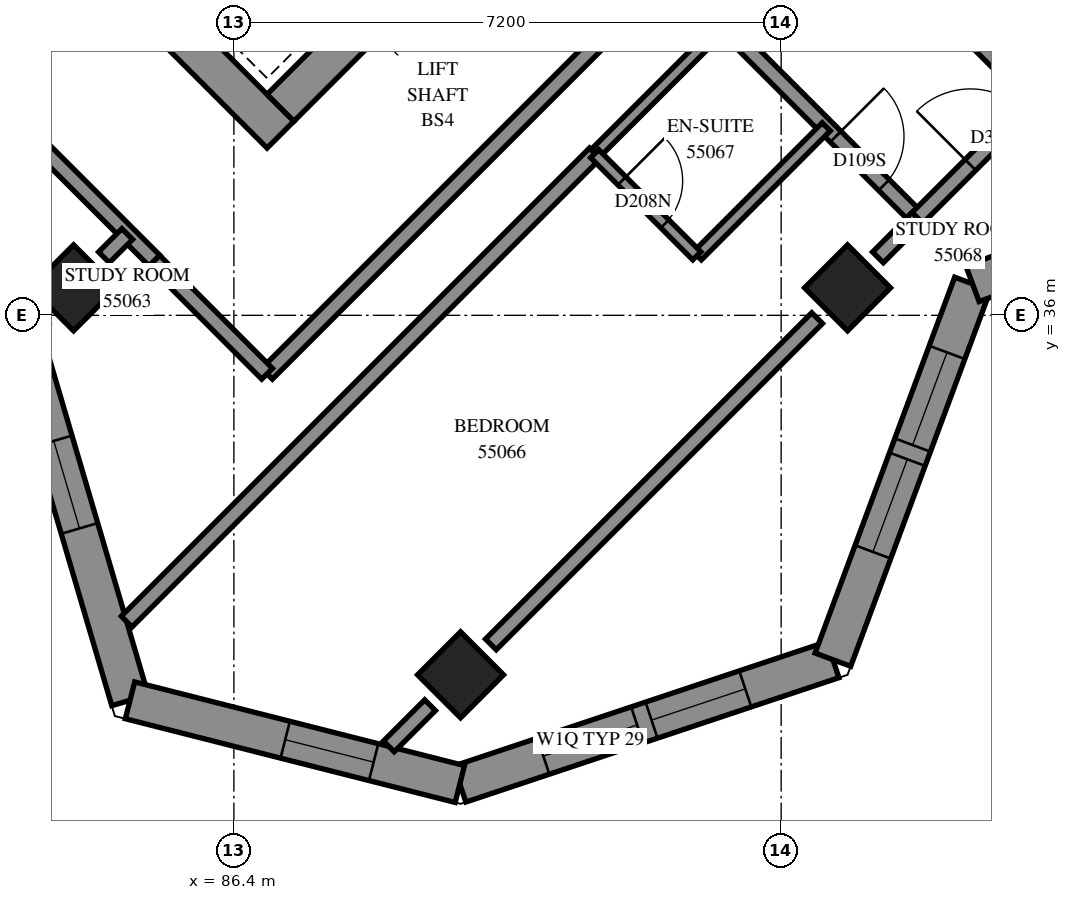
"""IFC4 building model, lengths in metres.
Left out: names, types, materials, properties, quantities, classifications, styles, units other than length and angle.
Written with IfcOpenShell. Run it as: python <this file> out.ifc"""

import sys

from ifc_helpers import new_model, si_unit, direction, frame, frame_2d, origin, origin_2d, place, context, subcontext, project, spatial, polyline, rectangle, outline, extrude, element, fill, save


model = new_model("IFC4")
c1 = context("Model", 3, precision=1e-05, world=origin(), true_north=direction((0.0, 1.0)))
c2 = subcontext(c1, "Body", "Model", "MODEL_VIEW")
j1 = project(units=[si_unit("LENGTHUNIT", "METRE"), si_unit("PLANEANGLEUNIT", "RADIAN")], contexts=[c1])
p1 = place(None, origin())
s1 = spatial("IfcSite", under=j1, at=p1, CompositionType="ELEMENT")
p2 = place(p1, origin())
s2 = spatial("IfcBuilding", under=s1, at=p2, CompositionType="ELEMENT")
p3 = place(p2, frame((0.0, 0.0, 203.2)))
s3 = spatial("IfcBuildingStorey", under=s2, at=p3, CompositionType="ELEMENT", Elevation=203.2)
for number, where, z_axis, x_axis in (
    (1, (84.291, 36.362, 0.0), (0.0, 0.0, 1.0), (0.707, -0.707, 0.0)),
    (2, (94.474, 36.362, 0.0), (0.0, 0.0, 1.0), (0.707, -0.707, 0.0)),
    (3, (89.382, 31.271, 0.0), (0.0, 0.0, 1.0), (0.707, -0.707, 0.0)),
):
    element("IfcColumn", number, at=place(p3, frame(where, z_axis=z_axis, x_axis=x_axis)), inside=s3, PredefinedType="COLUMN", context=c2, shape_type="SweptSolid", body=[
        extrude(rectangle(XDim=0.8, YDim=0.8, at=origin_2d()), origin(), (0.0, 0.0, 1.0), 3.1),
    ])
p4 = place(p3, frame((76.124, 49.267, -0.3), z_axis=(0.0, 0.0, 1.0), x_axis=(0.7071067812, -0.7071067812, 0.0)))
e4 = element("IfcWall", 4, at=p4, inside=s3, PredefinedType="SHEAR", context=c2, shape_type="SweptSolid", body=[
    extrude(rectangle(XDim=15.4, YDim=0.5, at=frame_2d((7.7, 0.0))), origin(), (0.0, 0.0, 1.0), 2.7),
])
p5 = place(p3, frame((87.013, 38.731, -0.3), z_axis=(0.0, 0.0, 1.0), x_axis=(0.7071067812, 0.7071067812, 0.0)))
e5 = element("IfcWall", 5, at=p5, inside=s3, PredefinedType="SHEAR", context=c2, shape_type="SweptSolid", body=[
    extrude(rectangle(XDim=14.4, YDim=0.5, at=frame_2d((7.2, 0.0))), origin(), (0.0, 0.0, 1.0), 2.7),
])
p6 = place(p5, frame((4.55, 0.0, 0.3)))
e6 = element("IfcOpeningElement", 6, at=p6, cuts=e5, PredefinedType="OPENING", context=c2, shape_type="SweptSolid", body=[
    extrude(rectangle(XDim=1.1, YDim=2.1, at=frame_2d((0.55, 1.05))), frame((0.0, 0.26, 0.0), z_axis=(0.0, -1.0, 0.0), x_axis=(1.0, 0.0, 0.0)), (0.0, 0.0, 1.0), 0.52),
])
p7 = place(p5, frame((11.35, 0.0, 0.3)))
e7 = element("IfcOpeningElement", 7, at=p7, cuts=e5, PredefinedType="OPENING", context=c2, shape_type="SweptSolid", body=[
    extrude(rectangle(XDim=1.1, YDim=2.1, at=frame_2d((0.55, 1.05))), frame((0.0, 0.26, 0.0), z_axis=(0.0, -1.0, 0.0), x_axis=(1.0, 0.0, 0.0)), (0.0, 0.0, 1.0), 0.52),
])
p8 = place(p3, frame((89.373, 29.834, 0.0), z_axis=(0.0, 0.0, 1.0), x_axis=(0.9486832981, 0.316227766, 0.0)))
e8 = element("IfcWall", 8, at=p8, inside=s3, PredefinedType="SOLIDWALL", context=c2, shape_type="SweptSolid", body=[
    extrude(outline(polyline([(-0.073, -0.25), (5.293, -0.25), (5.054, 0.25), (0.073, 0.25), (-0.073, -0.25)])), origin(), (0.0, 0.0, 1.0), 3.1),
])
p9 = place(p8, frame((1.159, 0.0, 0.45)))
e9 = element("IfcOpeningElement", 9, at=p9, cuts=e8, PredefinedType="OPENING", context=c2, shape_type="SweptSolid", body=[
    extrude(rectangle(XDim=1.3, YDim=2.5, at=frame_2d((0.65, 1.25))), frame((0.0, 0.26, 0.0), z_axis=(0.0, -1.0, 0.0), x_axis=(1.0, 0.0, 0.0)), (0.0, 0.0, 1.0), 0.52),
])
p10 = place(p8, frame((2.659, 0.0, 0.45)))
e10 = element("IfcOpeningElement", 10, at=p10, cuts=e8, PredefinedType="OPENING", context=c2, shape_type="SweptSolid", body=[
    extrude(rectangle(XDim=1.3, YDim=2.5, at=frame_2d((0.65, 1.25))), frame((0.0, 0.26, 0.0), z_axis=(0.0, -1.0, 0.0), x_axis=(1.0, 0.0, 0.0)), (0.0, 0.0, 1.0), 0.52),
])
p11 = place(p3, frame((94.281, 31.47, 0.0), z_axis=(0.0, 0.0, 1.0), x_axis=(0.3481903374, 0.9374238577, 0.0)))
e11 = element("IfcWall", 11, at=p11, inside=s3, PredefinedType="SOLIDWALL", context=c2, shape_type="SweptSolid", body=[
    extrude(outline(polyline([(-0.12, -0.25), (5.16, -0.25), (5.39, 0.25), (0.12, 0.25), (-0.12, -0.25)])), origin(), (0.0, 0.0, 1.0), 3.1),
])
p12 = place(p11, frame((1.512, 0.0, 0.45)))
e12 = element("IfcOpeningElement", 12, at=p12, cuts=e11, PredefinedType="OPENING", context=c2, shape_type="SweptSolid", body=[
    extrude(rectangle(XDim=1.3, YDim=2.5, at=frame_2d((0.65, 1.25))), frame((0.0, 0.26, 0.0), z_axis=(0.0, -1.0, 0.0), x_axis=(1.0, 0.0, 0.0)), (0.0, 0.0, 1.0), 0.52),
])
p13 = place(p11, frame((3.012, 0.0, 0.45)))
e13 = element("IfcOpeningElement", 13, at=p13, cuts=e11, PredefinedType="OPENING", context=c2, shape_type="SweptSolid", body=[
    extrude(rectangle(XDim=1.3, YDim=2.5, at=frame_2d((0.65, 1.25))), frame((0.0, 0.26, 0.0), z_axis=(0.0, -1.0, 0.0), x_axis=(1.0, 0.0, 0.0)), (0.0, 0.0, 1.0), 0.52),
])
p14 = place(p3, frame((96.118, 36.415, 0.0), z_axis=(0.0, 0.0, 1.0), x_axis=(0.9374238577, 0.3481903374, 0.0)))
e14 = element("IfcWall", 14, at=p14, inside=s3, PredefinedType="SOLIDWALL", context=c2, shape_type="SweptSolid", body=[
    extrude(outline(polyline([(0.115, -0.25), (5.395, -0.25), (5.155, 0.25), (-0.115, 0.25), (0.115, -0.25)])), origin(), (0.0, 0.0, 1.0), 3.1),
])
p15 = place(p14, frame((1.655, 0.0, 0.45)))
e15 = element("IfcOpeningElement", 15, at=p15, cuts=e14, PredefinedType="OPENING", context=c2, shape_type="SweptSolid", body=[
    extrude(rectangle(XDim=1.3, YDim=2.5, at=frame_2d((0.65, 1.25))), frame((0.0, 0.26, 0.0), z_axis=(0.0, -1.0, 0.0), x_axis=(1.0, 0.0, 0.0)), (0.0, 0.0, 1.0), 0.52),
])
p16 = place(p14, frame((3.155, 0.0, 0.45)))
e16 = element("IfcOpeningElement", 16, at=p16, cuts=e14, PredefinedType="OPENING", context=c2, shape_type="SweptSolid", body=[
    extrude(rectangle(XDim=1.3, YDim=2.5, at=frame_2d((0.65, 1.25))), frame((0.0, 0.26, 0.0), z_axis=(0.0, -1.0, 0.0), x_axis=(1.0, 0.0, 0.0)), (0.0, 0.0, 1.0), 0.52),
])
p17 = place(p3, frame((83.74, 35.336, 0.0), z_axis=(0.0, 0.0, 1.0), x_axis=(0.2820577435, -0.9593974303, 0.0)))
e17 = element("IfcWall", 17, at=p17, inside=s3, PredefinedType="SOLIDWALL", context=c2, shape_type="SweptSolid", body=[
    extrude(outline(polyline([(0.136, -0.25), (4.73, -0.25), (4.445, 0.25), (-0.136, 0.25), (0.136, -0.25)])), origin(), (0.0, 0.0, 1.0), 3.1),
])
p18 = place(p17, frame((1.03, 0.0, 0.45)))
e18 = element("IfcOpeningElement", 18, at=p18, cuts=e17, PredefinedType="OPENING", context=c2, shape_type="SweptSolid", body=[
    extrude(rectangle(XDim=1.2, YDim=2.5, at=frame_2d((0.6, 1.25))), frame((0.0, 0.26, 0.0), z_axis=(0.0, -1.0, 0.0), x_axis=(1.0, 0.0, 0.0)), (0.0, 0.0, 1.0), 0.52),
])
p19 = place(p3, frame((85.034, 30.935, 0.0), z_axis=(0.0, 0.0, 1.0), x_axis=(0.9692704293, -0.2459976318, 0.0)))
e19 = element("IfcWall", 19, at=p19, inside=s3, PredefinedType="SOLIDWALL", context=c2, shape_type="SweptSolid", body=[
    extrude(outline(polyline([(-0.142, -0.25), (4.55, -0.25), (4.404, 0.25), (0.142, 0.25), (-0.142, -0.25)])), origin(), (0.0, 0.0, 1.0), 3.1),
])
p20 = place(p19, frame((2.107, 0.0, 0.45)))
e20 = element("IfcOpeningElement", 20, at=p20, cuts=e19, PredefinedType="OPENING", context=c2, shape_type="SweptSolid", body=[
    extrude(rectangle(XDim=1.2, YDim=2.5, at=frame_2d((0.6, 1.25))), frame((0.0, 0.26, 0.0), z_axis=(0.0, -1.0, 0.0), x_axis=(1.0, 0.0, 0.0)), (0.0, 0.0, 1.0), 0.52),
])
p21 = place(p3, frame((84.99, 31.971, 0.0), z_axis=(0.0, 0.0, 1.0), x_axis=(0.7071067812, 0.7071067812, 0.0)))
e21 = element("IfcWall", 21, at=p21, inside=s3, PredefinedType="PARTITIONING", context=c2, shape_type="SweptSolid", body=[
    extrude(rectangle(XDim=8.711, YDim=0.2, at=frame_2d((4.356, 0.0))), origin(), (0.0, 0.0, 1.0), 3.1),
])
p22 = place(p3, frame((86.835, 35.231, 0.0), z_axis=(0.0, 0.0, 1.0), x_axis=(0.7071067812, 0.7071067812, 0.0)))
e22 = element("IfcWall", 22, at=p22, inside=s3, PredefinedType="PARTITIONING", context=c2, shape_type="SweptSolid", body=[
    extrude(rectangle(XDim=7.501, YDim=0.2, at=frame_2d((3.751, 0.0))), origin(), (0.0, 0.0, 1.0), 3.1),
])
p23 = place(p22, frame((6.243, 0.0, 0.0)))
e23 = element("IfcOpeningElement", 23, at=p23, cuts=e22, PredefinedType="OPENING", context=c2, shape_type="SweptSolid", body=[
    extrude(rectangle(XDim=1.0, YDim=2.1, at=frame_2d((0.5, 1.05))), frame((0.0, 0.11, 0.0), z_axis=(0.0, -1.0, 0.0), x_axis=(1.0, 0.0, 0.0)), (0.0, 0.0, 1.0), 0.22),
])
p24 = place(p3, frame((80.522, 41.553, 0.0), z_axis=(0.0, 0.0, 1.0), x_axis=(0.7071067812, -0.7071067812, 0.0)))
e24 = element("IfcWall", 24, at=p24, inside=s3, PredefinedType="PARTITIONING", context=c2, shape_type="SweptSolid", body=[
    extrude(rectangle(XDim=6.836, YDim=0.2, at=frame_2d((3.418, 0.0))), origin(), (0.0, 0.0, 1.0), 3.1),
])
p25 = place(p3, frame((89.781, 31.671, 0.0), z_axis=(0.0, 0.0, 1.0), x_axis=(0.7071067812, 0.7071067812, 0.0)))
e25 = element("IfcWall", 25, at=p25, inside=s3, PredefinedType="PARTITIONING", context=c2, shape_type="SweptSolid", body=[
    extrude(rectangle(XDim=6.07, YDim=0.2, at=frame_2d((3.035, 0.0))), origin(), (0.0, 0.0, 1.0), 2.6),
])
p26 = place(p3, frame((93.693, 42.085, 0.0), z_axis=(0.0, 0.0, 1.0), x_axis=(0.7071067812, -0.7071067812, 0.0)))
e26 = element("IfcWall", 26, at=p26, inside=s3, PredefinedType="PARTITIONING", context=c2, shape_type="SweptSolid", body=[
    extrude(rectangle(XDim=4.599, YDim=0.2, at=frame_2d((2.3, 0.0))), origin(), (0.0, 0.0, 1.0), 3.1),
])
p27 = place(p26, frame((1.349, 0.0, 0.0)))
e27 = element("IfcOpeningElement", 27, at=p27, cuts=e26, PredefinedType="OPENING", context=c2, shape_type="SweptSolid", body=[
    extrude(rectangle(XDim=0.9, YDim=2.1, at=frame_2d((0.45, 1.05))), frame((0.0, 0.11, 0.0), z_axis=(0.0, -1.0, 0.0), x_axis=(1.0, 0.0, 0.0)), (0.0, 0.0, 1.0), 0.22),
])
p28 = place(p3, frame((92.137, 40.531, 0.0), z_axis=(0.0, 0.0, 1.0), x_axis=(0.7071067812, -0.7071067812, 0.0)))
e28 = element("IfcWall", 28, at=p28, inside=s3, PredefinedType="PARTITIONING", context=c2, shape_type="SweptSolid", body=[
    extrude(rectangle(XDim=4.599, YDim=0.2, at=frame_2d((2.3, 0.0))), origin(), (0.0, 0.0, 1.0), 3.1),
])
p29 = place(p28, frame((3.083, 0.0, 0.0)))
e29 = element("IfcOpeningElement", 29, at=p29, cuts=e28, PredefinedType="OPENING", context=c2, shape_type="SweptSolid", body=[
    extrude(rectangle(XDim=0.9, YDim=2.1, at=frame_2d((0.45, 1.05))), frame((0.0, 0.11, 0.0), z_axis=(0.0, -1.0, 0.0), x_axis=(1.0, 0.0, 0.0)), (0.0, 0.0, 1.0), 0.22),
])
for number, where, z_axis, x_axis in (
    (30, (91.152, 38.128, 0.0), (0.0, 0.0, 1.0), (0.708, 0.707, 0.0)),
    (31, (92.497, 36.783, 0.0), (0.0, 0.0, 1.0), (0.707, 0.708, 0.0)),
):
    element("IfcWall", number, at=place(p3, frame(where, z_axis=z_axis, x_axis=x_axis)), inside=s3, PredefinedType="PARTITIONING", context=c2, shape_type="SweptSolid", body=[
        extrude(rectangle(XDim=2.4, YDim=0.15, at=frame_2d((1.2, 0.0))), origin(), (0.0, 0.0, 1.0), 3.1),
    ])
p30 = place(p3, frame((95.392, 37.282, 0.0), z_axis=(0.0, 0.0, 1.0), x_axis=(0.7075613659, 0.706651904, 0.0)))
e32 = element("IfcWall", 32, at=p30, inside=s3, PredefinedType="PARTITIONING", context=c2, shape_type="SweptSolid", body=[
    extrude(rectangle(XDim=2.199, YDim=0.2, at=frame_2d((1.1, 0.0))), origin(), (0.0, 0.0, 1.0), 2.6),
])
p31 = place(p30, frame((0.987, 0.0, 0.0)))
e33 = element("IfcOpeningElement", 33, at=p31, cuts=e32, PredefinedType="OPENING", context=c2, shape_type="SweptSolid", body=[
    extrude(rectangle(XDim=1.0, YDim=2.1, at=frame_2d((0.5, 1.05))), frame((0.0, 0.11, 0.0), z_axis=(0.0, -1.0, 0.0), x_axis=(1.0, 0.0, 0.0)), (0.0, 0.0, 1.0), 0.22),
])
p32 = place(p3, frame((85.353, 36.717, 0.0), z_axis=(0.0, 0.0, 1.0), x_axis=(0.7066304548, -0.7075827869, 0.0)))
e34 = element("IfcWall", 34, at=p32, inside=s3, PredefinedType="PARTITIONING", context=c2, shape_type="SweptSolid", body=[
    extrude(rectangle(XDim=2.1, YDim=0.2, at=frame_2d((1.05, 0.0))), origin(), (0.0, 0.0, 1.0), 3.1),
])
p33 = place(p3, frame((91.147, 38.127, 0.0), z_axis=(0.0, 0.0, 1.0), x_axis=(0.7071067812, -0.7071067812, 0.0)))
e35 = element("IfcWall", 35, at=p33, inside=s3, PredefinedType="PARTITIONING", context=c2, shape_type="SweptSolid", body=[
    extrude(rectangle(XDim=1.901, YDim=0.15, at=frame_2d((0.95, 0.0))), origin(), (0.0, 0.0, 1.0), 3.1),
])
p34 = place(p33, frame((0.506, 0.0, 0.0)))
e36 = element("IfcOpeningElement", 36, at=p34, cuts=e35, PredefinedType="OPENING", context=c2, shape_type="SweptSolid", body=[
    extrude(rectangle(XDim=0.8, YDim=2.1, at=frame_2d((0.4, 1.05))), frame((0.0, 0.085, 0.0), z_axis=(0.0, -1.0, 0.0), x_axis=(1.0, 0.0, 0.0)), (0.0, 0.0, 1.0), 0.17),
])
p35 = place(p3, frame((94.874, 36.763, 0.0), z_axis=(0.0, 0.0, 1.0), x_axis=(0.7057430303, 0.7084679069, 0.0)))
e37 = element("IfcWall", 37, at=p35, inside=s3, PredefinedType="PARTITIONING", context=c2, shape_type="SweptSolid", body=[
    extrude(rectangle(XDim=0.734, YDim=0.2, at=frame_2d((0.367, 0.0))), origin(), (0.0, 0.0, 1.0), 2.6),
])
p36 = place(p3, frame((88.439, 30.329, 0.0), z_axis=(0.0, 0.0, 1.0), x_axis=(0.7071067812, 0.7071067812, 0.0)))
e38 = element("IfcWall", 38, at=p36, inside=s3, PredefinedType="PARTITIONING", context=c2, shape_type="SweptSolid", body=[
    extrude(rectangle(XDim=0.767, YDim=0.2, at=frame_2d((0.383, 0.0))), origin(), (0.0, 0.0, 1.0), 3.1),
])
p37 = place(p3, frame((84.691, 36.763, 0.0), z_axis=(0.0, 0.0, 1.0), x_axis=(0.7071067812, 0.7071067812, 0.0)))
e39 = element("IfcWall", 39, at=p37, inside=s3, PredefinedType="PARTITIONING", context=c2, shape_type="SweptSolid", body=[
    extrude(rectangle(XDim=0.433, YDim=0.2, at=frame_2d((0.216, 0.0))), origin(), (0.0, 0.0, 1.0), 3.1),
])
p38 = place(p9, origin())
e40 = element("IfcWindow", 40, at=p38, inside=s3, PartitioningType="SINGLE_PANEL", PredefinedType="WINDOW", context=c2, shape_type="SweptSolid", body=[
    extrude(rectangle(XDim=1.3, YDim=2.5, at=frame_2d((0.65, 1.25))), frame((0.0, 0.18, 0.0), z_axis=(0.0, -1.0, 0.0), x_axis=(1.0, 0.0, 0.0)), (0.0, 0.0, 1.0), 0.06),
])
fill(e9, e40)
p39 = place(p10, origin())
e41 = element("IfcWindow", 41, at=p39, inside=s3, PartitioningType="SINGLE_PANEL", PredefinedType="WINDOW", context=c2, shape_type="SweptSolid", body=[
    extrude(rectangle(XDim=1.3, YDim=2.5, at=frame_2d((0.65, 1.25))), frame((0.0, 0.18, 0.0), z_axis=(0.0, -1.0, 0.0), x_axis=(1.0, 0.0, 0.0)), (0.0, 0.0, 1.0), 0.06),
])
fill(e10, e41)
p40 = place(p12, origin())
e42 = element("IfcWindow", 42, at=p40, inside=s3, PartitioningType="SINGLE_PANEL", PredefinedType="WINDOW", context=c2, shape_type="SweptSolid", body=[
    extrude(rectangle(XDim=1.3, YDim=2.5, at=frame_2d((0.65, 1.25))), frame((0.0, 0.18, 0.0), z_axis=(0.0, -1.0, 0.0), x_axis=(1.0, 0.0, 0.0)), (0.0, 0.0, 1.0), 0.06),
])
fill(e12, e42)
p41 = place(p13, origin())
e43 = element("IfcWindow", 43, at=p41, inside=s3, PartitioningType="SINGLE_PANEL", PredefinedType="WINDOW", context=c2, shape_type="SweptSolid", body=[
    extrude(rectangle(XDim=1.3, YDim=2.5, at=frame_2d((0.65, 1.25))), frame((0.0, 0.18, 0.0), z_axis=(0.0, -1.0, 0.0), x_axis=(1.0, 0.0, 0.0)), (0.0, 0.0, 1.0), 0.06),
])
fill(e13, e43)
p42 = place(p18, origin())
e44 = element("IfcWindow", 44, at=p42, inside=s3, PartitioningType="SINGLE_PANEL", PredefinedType="WINDOW", context=c2, shape_type="SweptSolid", body=[
    extrude(rectangle(XDim=1.2, YDim=2.5, at=frame_2d((0.6, 1.25))), frame((0.0, 0.18, 0.0), z_axis=(0.0, -1.0, 0.0), x_axis=(1.0, 0.0, 0.0)), (0.0, 0.0, 1.0), 0.06),
])
fill(e18, e44)
p43 = place(p20, origin())
e45 = element("IfcWindow", 45, at=p43, inside=s3, PartitioningType="SINGLE_PANEL", PredefinedType="WINDOW", context=c2, shape_type="SweptSolid", body=[
    extrude(rectangle(XDim=1.2, YDim=2.5, at=frame_2d((0.6, 1.25))), frame((0.0, 0.18, 0.0), z_axis=(0.0, -1.0, 0.0), x_axis=(1.0, 0.0, 0.0)), (0.0, 0.0, 1.0), 0.06),
])
fill(e20, e45)
p44 = place(p29, origin())
e46 = element("IfcDoor", 46, at=p44, inside=s3, OperationType="SINGLE_SWING_LEFT", PredefinedType="DOOR", context=c2, shape_type="SweptSolid", body=[
    extrude(rectangle(XDim=0.9, YDim=2.1, at=frame_2d((0.45, 1.05))), frame((0.0, 0.025, 0.0), z_axis=(0.0, -1.0, 0.0), x_axis=(1.0, 0.0, 0.0)), (0.0, 0.0, 1.0), 0.05),
])
fill(e29, e46)
p45 = place(p34, origin())
e47 = element("IfcDoor", 47, at=p45, inside=s3, OperationType="SINGLE_SWING_RIGHT", PredefinedType="DOOR", context=c2, shape_type="SweptSolid", body=[
    extrude(rectangle(XDim=0.8, YDim=2.1, at=frame_2d((0.4, 1.05))), frame((0.0, 0.025, 0.0), z_axis=(0.0, -1.0, 0.0), x_axis=(1.0, 0.0, 0.0)), (0.0, 0.0, 1.0), 0.05),
])
fill(e36, e47)
p46 = place(p31, origin())
e48 = element("IfcDoor", 48, at=p46, inside=s3, OperationType="SINGLE_SWING_RIGHT", PredefinedType="DOOR", context=c2, shape_type="SweptSolid", body=[
    extrude(rectangle(XDim=1.0, YDim=2.1, at=frame_2d((0.5, 1.05))), frame((0.0, 0.025, 0.0), z_axis=(0.0, -1.0, 0.0), x_axis=(1.0, 0.0, 0.0)), (0.0, 0.0, 1.0), 0.05),
])
fill(e33, e48)
save(model, sys.argv[1])
